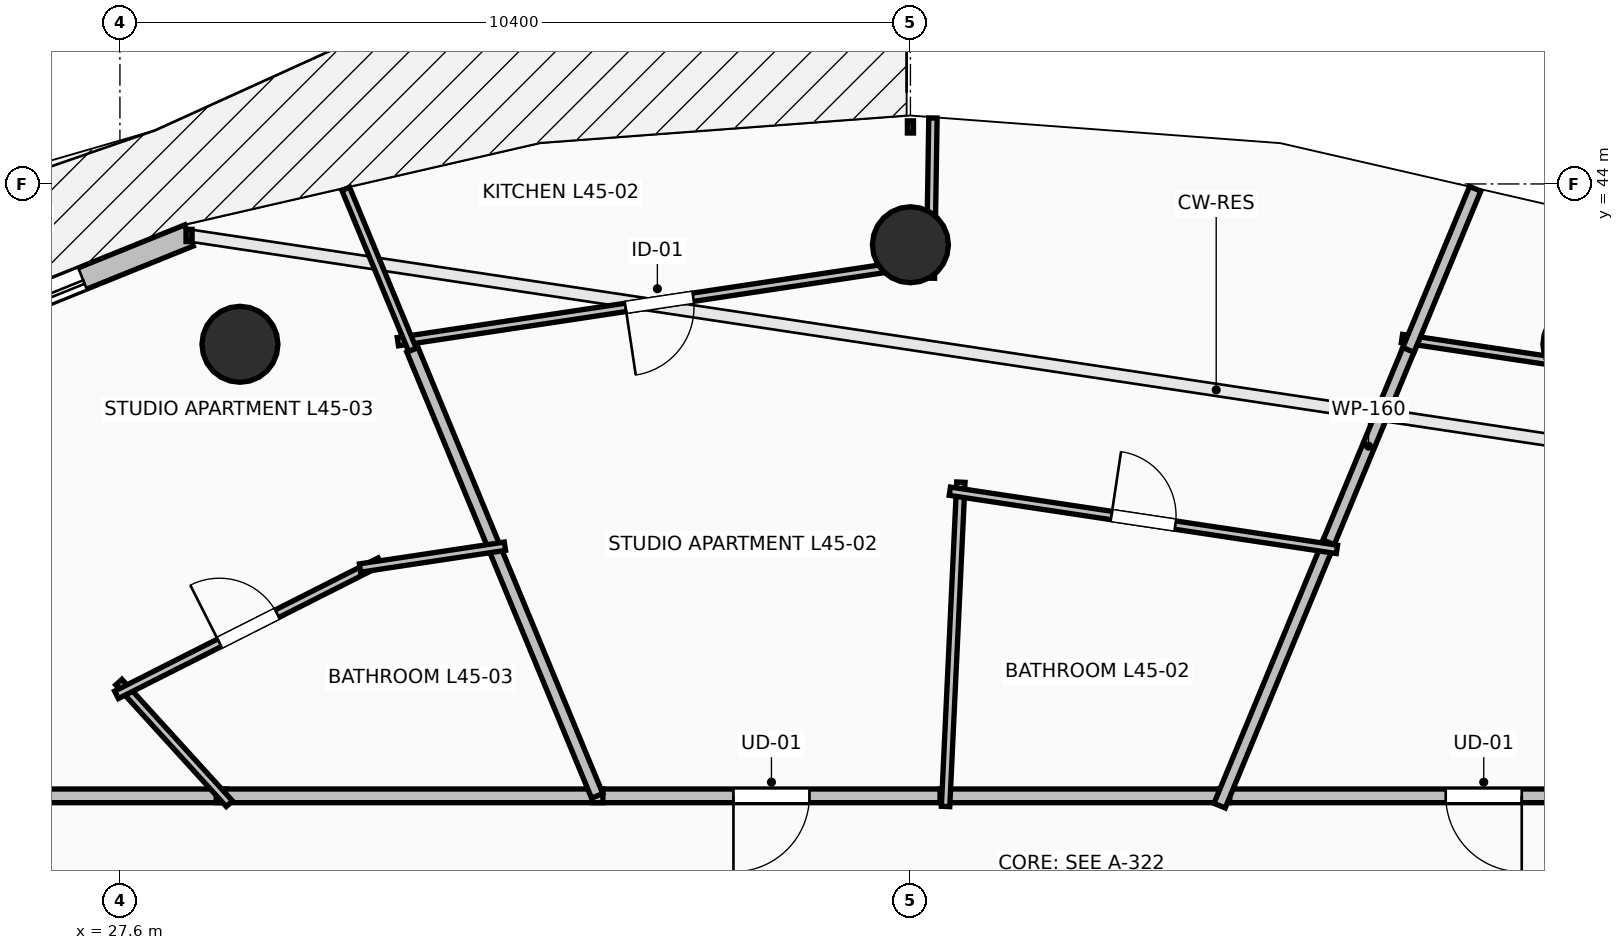
"""IFC4 building model, lengths in metres.
Left out: names, types, materials, properties, quantities, classifications, styles, units other than length and angle.
Written with IfcOpenShell. Run it as: python <this file> out.ifc"""

import sys

from ifc_helpers import new_model, si_unit, direction, frame, frame_2d, origin, origin_2d, place, context, subcontext, project, spatial, rectangle, circle, extrude, element, fill, save


model = new_model("IFC4")
c1 = context("Model", 3, precision=1e-05, world=origin(), true_north=direction((0.0, 1.0)))
c2 = subcontext(c1, "Body", "Model", "MODEL_VIEW")
j1 = project(units=[si_unit("LENGTHUNIT", "METRE"), si_unit("PLANEANGLEUNIT", "RADIAN")], contexts=[c1])
p1 = place(None, origin())
s1 = spatial("IfcSite", under=j1, at=p1, CompositionType="ELEMENT")
p2 = place(p1, origin())
s2 = spatial("IfcBuilding", under=s1, at=p2, CompositionType="ELEMENT")
p3 = place(p2, frame((0.0, 0.0, 167.6)))
s3 = spatial("IfcBuildingStorey", under=s2, at=p3, CompositionType="ELEMENT", Elevation=167.6)
for number, where, z_axis, x_axis in (
    (1, (46.821, 41.891, 0.0), (0.0, 0.0, 1.0), (0.383, 0.924, 0.0)),
    (2, (38.0, 43.2, 0.0), (0.0, 0.0, 1.0), (0.0, 1.0, 0.0)),
    (3, (29.179, 41.891, 0.0), (0.0, 0.0, 1.0), (-0.383, 0.924, 0.0)),
):
    element("IfcColumn", number, at=place(p3, frame(where, z_axis=z_axis, x_axis=x_axis)), inside=s3, PredefinedType="COLUMN", context=c2, shape_type="SweptSolid", body=[
        extrude(circle(Radius=0.5, at=origin_2d()), origin(), (0.0, 0.0, 1.0), 3.5),
    ])
p4 = place(p3, frame((28.51, 43.323, 0.0), z_axis=(0.0, 0.0, 1.0), x_axis=(-0.927156504392, -0.374674280359, 0.0)))
e4 = element("IfcWall", 4, at=p4, inside=s3, PredefinedType="STANDARD", context=c2, shape_type="SweptSolid", body=[
    extrude(rectangle(XDim=4.625, YDim=0.3, at=frame_2d((2.312, 0.0))), origin(), (0.0, 0.0, 1.0), 3.24),
])
p5 = place(p4, frame((1.512, 0.0, 0.0)))
e5 = element("IfcOpeningElement", 5, at=p5, cuts=e4, PredefinedType="OPENING", context=c2, shape_type="SweptSolid", body=[
    extrude(rectangle(XDim=1.6, YDim=2.3, at=frame_2d((0.8, 1.15))), frame((0.0, 0.165, 0.0), z_axis=(0.0, -1.0, 0.0), x_axis=(1.0, 0.0, 0.0)), (0.0, 0.0, 1.0), 0.33),
])
p6 = place(p3, frame((49.024, 35.95, 0.0), z_axis=(0.0, 0.0, 1.0), x_axis=(-1.0, 0.0, 0.0)))
e6 = element("IfcWall", 6, at=p6, inside=s3, PredefinedType="PARTITIONING", context=c2, shape_type="SweptSolid", body=[
    extrude(rectangle(XDim=6.963, YDim=0.18, at=frame_2d((3.481, 0.0))), origin(), (0.0, 0.0, 1.0), 2.432),
])
p7 = place(p6, frame((2.981, 0.0, 0.0)))
e7 = element("IfcOpeningElement", 7, at=p7, cuts=e6, PredefinedType="OPENING", context=c2, shape_type="SweptSolid", body=[
    extrude(rectangle(XDim=1.0, YDim=2.15, at=frame_2d((0.5, 1.075))), frame((0.0, 0.105, 0.0), z_axis=(0.0, -1.0, 0.0), x_axis=(1.0, 0.0, 0.0)), (0.0, 0.0, 1.0), 0.21),
])
p8 = place(p3, frame((38.529, 35.95, 0.0), z_axis=(0.0, 0.0, 1.0), x_axis=(-1.0, 0.0, 0.0)))
e8 = element("IfcWall", 8, at=p8, inside=s3, PredefinedType="PARTITIONING", context=c2, shape_type="SweptSolid", body=[
    extrude(rectangle(XDim=4.715, YDim=0.18, at=frame_2d((2.357, 0.0))), origin(), (0.0, 0.0, 1.0), 3.24),
])
p9 = place(p8, frame((1.857, 0.0, 0.0)))
e9 = element("IfcOpeningElement", 9, at=p9, cuts=e8, PredefinedType="OPENING", context=c2, shape_type="SweptSolid", body=[
    extrude(rectangle(XDim=1.0, YDim=2.15, at=frame_2d((0.5, 1.075))), frame((0.0, 0.105, 0.0), z_axis=(0.0, -1.0, 0.0), x_axis=(1.0, 0.0, 0.0)), (0.0, 0.0, 1.0), 0.21),
])
p10 = place(p3, frame((42.201, 35.95, 0.0), z_axis=(0.0, 0.0, 1.0), x_axis=(-1.0, 0.0, 0.0)))
e10 = element("IfcWall", 10, at=p10, inside=s3, PredefinedType="PARTITIONING", context=c2, shape_type="SweptSolid", body=[
    extrude(rectangle(XDim=3.812, YDim=0.18, at=frame_2d((1.906, 0.0))), origin(), (0.0, 0.0, 1.0), 3.24),
])
p11 = place(p3, frame((29.006, 35.95, 0.0), z_axis=(0.0, 0.0, 1.0), x_axis=(-1.0, 0.0, 0.0)))
e11 = element("IfcWall", 11, at=p11, inside=s3, PredefinedType="PARTITIONING", context=c2, shape_type="SweptSolid", body=[
    extrude(rectangle(XDim=3.806, YDim=0.18, at=frame_2d((1.903, 0.0))), origin(), (0.0, 0.0, 1.0), 2.432),
])
p12 = place(p3, frame((33.954, 35.95, 0.0), z_axis=(0.0, 0.0, 1.0), x_axis=(-1.0, 0.0, 0.0)))
e12 = element("IfcWall", 12, at=p12, inside=s3, PredefinedType="PARTITIONING", context=c2, shape_type="SweptSolid", body=[
    extrude(rectangle(XDim=5.088, YDim=0.18, at=frame_2d((2.544, 0.0))), origin(), (0.0, 0.0, 1.0), 2.432),
])
p13 = place(p3, frame((46.71, 41.63, 0.0), z_axis=(0.0, 0.0, 1.0), x_axis=(-0.988930827604, 0.14837728335, 0.0)))
e13 = element("IfcWall", 13, at=p13, inside=s3, PredefinedType="PARTITIONING", context=c2, shape_type="SweptSolid", body=[
    extrude(rectangle(XDim=2.269, YDim=0.11, at=frame_2d((1.135, 0.0))), origin(), (0.0, 0.0, 1.0), 3.24),
])
p14 = place(p3, frame((44.605, 41.946, 0.0), z_axis=(0.0, 0.0, 1.0), x_axis=(-0.382777783416, -0.923840445382, 0.0)))
e14 = element("IfcWall", 14, at=p14, inside=s3, PredefinedType="PARTITIONING", context=c2, shape_type="SweptSolid", body=[
    extrude(rectangle(XDim=3.02, YDim=0.16, at=frame_2d((1.51, 0.0))), origin(), (0.0, 0.0, 1.0), 2.929),
])
p15 = place(p3, frame((43.503, 39.285, 0.0), z_axis=(0.0, 0.0, 1.0), x_axis=(-0.382867331148, -0.923803337697, 0.0)))
e15 = element("IfcWall", 15, at=p15, inside=s3, PredefinedType="PARTITIONING", context=c2, shape_type="SweptSolid", body=[
    extrude(rectangle(XDim=3.75, YDim=0.16, at=frame_2d((1.875, 0.0))), origin(), (0.0, 0.0, 1.0), 2.874),
])
p16 = place(p3, frame((45.43, 43.936, 0.0), z_axis=(0.0, 0.0, 1.0), x_axis=(-0.382755897173, -0.923849513276, 0.0)))
e16 = element("IfcWall", 16, at=p16, inside=s3, PredefinedType="PARTITIONING", context=c2, shape_type="SweptSolid", body=[
    extrude(rectangle(XDim=2.294, YDim=0.16, at=frame_2d((1.147, 0.0))), origin(), (0.0, 0.0, 1.0), 2.728),
])
p17 = place(p3, frame((38.462, 35.81, 0.0), z_axis=(0.0, 0.0, 1.0), x_axis=(0.047098053516, 0.998890270928, 0.0)))
e17 = element("IfcWall", 17, at=p17, inside=s3, PredefinedType="PARTITIONING", context=c2, shape_type="SweptSolid", body=[
    extrude(rectangle(XDim=4.271, YDim=0.11, at=frame_2d((2.136, 0.0))), origin(), (0.0, 0.0, 1.0), 2.874),
])
p18 = place(p3, frame((38.519, 39.958, 0.0), z_axis=(0.0, 0.0, 1.0), x_axis=(0.988887618714, -0.14866498429, 0.0)))
e18 = element("IfcWall", 18, at=p18, inside=s3, PredefinedType="PARTITIONING", context=c2, shape_type="SweptSolid", body=[
    extrude(rectangle(XDim=5.15, YDim=0.11, at=frame_2d((2.575, 0.0))), origin(), (0.0, 0.0, 1.0), 2.929),
])
p19 = place(p18, frame((2.15, 0.0, 0.0)))
e19 = element("IfcOpeningElement", 19, at=p19, cuts=e18, PredefinedType="OPENING", context=c2, shape_type="SweptSolid", body=[
    extrude(rectangle(XDim=0.85, YDim=2.1, at=frame_2d((0.425, 1.05))), frame((0.0, 0.07, 0.0), z_axis=(0.0, -1.0, 0.0), x_axis=(1.0, 0.0, 0.0)), (0.0, 0.0, 1.0), 0.14),
])
p20 = place(p3, frame((38.296, 44.868, 0.0), z_axis=(0.0, 0.0, 1.0), x_axis=(-0.015865503416, -0.99987413498, 0.0)))
e20 = element("IfcWall", 20, at=p20, inside=s3, PredefinedType="PARTITIONING", context=c2, shape_type="SweptSolid", body=[
    extrude(rectangle(XDim=2.108, YDim=0.11, at=frame_2d((1.054, 0.0))), origin(), (0.0, 0.0, 1.0), 2.728),
])
p21 = place(p3, frame((38.138, 42.961, 0.0), z_axis=(0.0, 0.0, 1.0), x_axis=(-0.988870381513, -0.148779597275, 0.0)))
e21 = element("IfcWall", 21, at=p21, inside=s3, PredefinedType="PARTITIONING", context=c2, shape_type="SweptSolid", body=[
    extrude(rectangle(XDim=6.959, YDim=0.11, at=frame_2d((3.479, 0.0))), origin(), (0.0, 0.0, 1.0), 2.432),
])
p22 = place(p21, frame((3.03, 0.0, 0.0)))
e22 = element("IfcOpeningElement", 22, at=p22, cuts=e21, PredefinedType="OPENING", context=c2, shape_type="SweptSolid", body=[
    extrude(rectangle(XDim=0.9, YDim=2.1, at=frame_2d((0.45, 1.05))), frame((0.0, 0.07, 0.0), z_axis=(0.0, -1.0, 0.0), x_axis=(1.0, 0.0, 0.0)), (0.0, 0.0, 1.0), 0.14),
])
p23 = place(p3, frame((31.448, 41.817, 0.0), z_axis=(0.0, 0.0, 1.0), x_axis=(-0.382755897173, 0.923849513276, 0.0)))
e23 = element("IfcWall", 23, at=p23, inside=s3, PredefinedType="PARTITIONING", context=c2, shape_type="SweptSolid", body=[
    extrude(rectangle(XDim=2.294, YDim=0.11, at=frame_2d((1.147, 0.0))), origin(), (0.0, 0.0, 1.0), 2.728),
])
p24 = place(p3, frame((31.448, 41.817, 0.0), z_axis=(0.0, 0.0, 1.0), x_axis=(0.382730952295, -0.92385984768, 0.0)))
e24 = element("IfcWall", 24, at=p24, inside=s3, PredefinedType="PARTITIONING", context=c2, shape_type="SweptSolid", body=[
    extrude(rectangle(XDim=6.35, YDim=0.16, at=frame_2d((3.175, 0.0))), origin(), (0.0, 0.0, 1.0), 2.432),
])
p25 = place(p3, frame((29.04, 35.846, 0.0), z_axis=(0.0, 0.0, 1.0), x_axis=(-0.672886377769, 0.739745850014, 0.0)))
e25 = element("IfcWall", 25, at=p25, inside=s3, PredefinedType="PARTITIONING", context=c2, shape_type="SweptSolid", body=[
    extrude(rectangle(XDim=2.162, YDim=0.11, at=frame_2d((1.081, 0.0))), origin(), (0.0, 0.0, 1.0), 2.432),
])
p26 = place(p3, frame((27.555, 37.279, 0.0), z_axis=(0.0, 0.0, 1.0), x_axis=(0.892457700076, 0.451131082475, 0.0)))
e26 = element("IfcWall", 26, at=p26, inside=s3, PredefinedType="PARTITIONING", context=c2, shape_type="SweptSolid", body=[
    extrude(rectangle(XDim=3.885, YDim=0.11, at=frame_2d((1.942, 0.0))), origin(), (0.0, 0.0, 1.0), 2.432),
])
p27 = place(p26, frame((1.517, 0.0, 0.0)))
e27 = element("IfcOpeningElement", 27, at=p27, cuts=e26, PredefinedType="OPENING", context=c2, shape_type="SweptSolid", body=[
    extrude(rectangle(XDim=0.85, YDim=2.1, at=frame_2d((0.425, 1.05))), frame((0.0, 0.07, 0.0), z_axis=(0.0, -1.0, 0.0), x_axis=(1.0, 0.0, 0.0)), (0.0, 0.0, 1.0), 0.14),
])
p28 = place(p3, frame((30.759, 38.947, 0.0), z_axis=(0.0, 0.0, 1.0), x_axis=(0.988889867338, 0.148650026153, 0.0)))
e28 = element("IfcWall", 28, at=p28, inside=s3, PredefinedType="PARTITIONING", context=c2, shape_type="SweptSolid", body=[
    extrude(rectangle(XDim=1.928, YDim=0.11, at=frame_2d((0.964, 0.0))), origin(), (0.0, 0.0, 1.0), 2.929),
])
p29 = place(p5, origin())
e29 = element("IfcDoor", 29, at=p29, inside=s3, OperationType="SLIDING_TO_LEFT", PredefinedType="DOOR", context=c2, shape_type="SweptSolid", body=[
    extrude(rectangle(XDim=1.6, YDim=2.3, at=frame_2d((0.8, 1.15))), frame((0.0, 0.025, 0.0), z_axis=(0.0, -1.0, 0.0), x_axis=(1.0, 0.0, 0.0)), (0.0, 0.0, 1.0), 0.05),
])
fill(e5, e29)
p30 = place(p7, origin())
e30 = element("IfcDoor", 30, at=p30, inside=s3, OperationType="SINGLE_SWING_LEFT", PredefinedType="DOOR", context=c2, shape_type="SweptSolid", body=[
    extrude(rectangle(XDim=1.0, YDim=2.15, at=frame_2d((0.5, 1.075))), frame((0.0, 0.025, 0.0), z_axis=(0.0, -1.0, 0.0), x_axis=(1.0, 0.0, 0.0)), (0.0, 0.0, 1.0), 0.05),
])
fill(e7, e30)
p31 = place(p9, origin())
e31 = element("IfcDoor", 31, at=p31, inside=s3, OperationType="SINGLE_SWING_RIGHT", PredefinedType="DOOR", context=c2, shape_type="SweptSolid", body=[
    extrude(rectangle(XDim=1.0, YDim=2.15, at=frame_2d((0.5, 1.075))), frame((0.0, 0.025, 0.0), z_axis=(0.0, -1.0, 0.0), x_axis=(1.0, 0.0, 0.0)), (0.0, 0.0, 1.0), 0.05),
])
fill(e9, e31)
p32 = place(p19, origin())
e32 = element("IfcDoor", 32, at=p32, inside=s3, OperationType="SINGLE_SWING_LEFT", PredefinedType="DOOR", context=c2, shape_type="SweptSolid", body=[
    extrude(rectangle(XDim=0.85, YDim=2.1, at=frame_2d((0.425, 1.05))), frame((0.0, 0.025, 0.0), z_axis=(0.0, -1.0, 0.0), x_axis=(1.0, 0.0, 0.0)), (0.0, 0.0, 1.0), 0.05),
])
fill(e19, e32)
p33 = place(p22, origin())
e33 = element("IfcDoor", 33, at=p33, inside=s3, OperationType="SINGLE_SWING_RIGHT", PredefinedType="DOOR", context=c2, shape_type="SweptSolid", body=[
    extrude(rectangle(XDim=0.9, YDim=2.1, at=frame_2d((0.45, 1.05))), frame((0.0, 0.025, 0.0), z_axis=(0.0, -1.0, 0.0), x_axis=(1.0, 0.0, 0.0)), (0.0, 0.0, 1.0), 0.05),
])
fill(e22, e33)
p34 = place(p27, origin())
e34 = element("IfcDoor", 34, at=p34, inside=s3, OperationType="SINGLE_SWING_LEFT", PredefinedType="DOOR", context=c2, shape_type="SweptSolid", body=[
    extrude(rectangle(XDim=0.85, YDim=2.1, at=frame_2d((0.425, 1.05))), frame((0.0, 0.025, 0.0), z_axis=(0.0, -1.0, 0.0), x_axis=(1.0, 0.0, 0.0)), (0.0, 0.0, 1.0), 0.05),
])
fill(e27, e34)
save(model, sys.argv[1])
